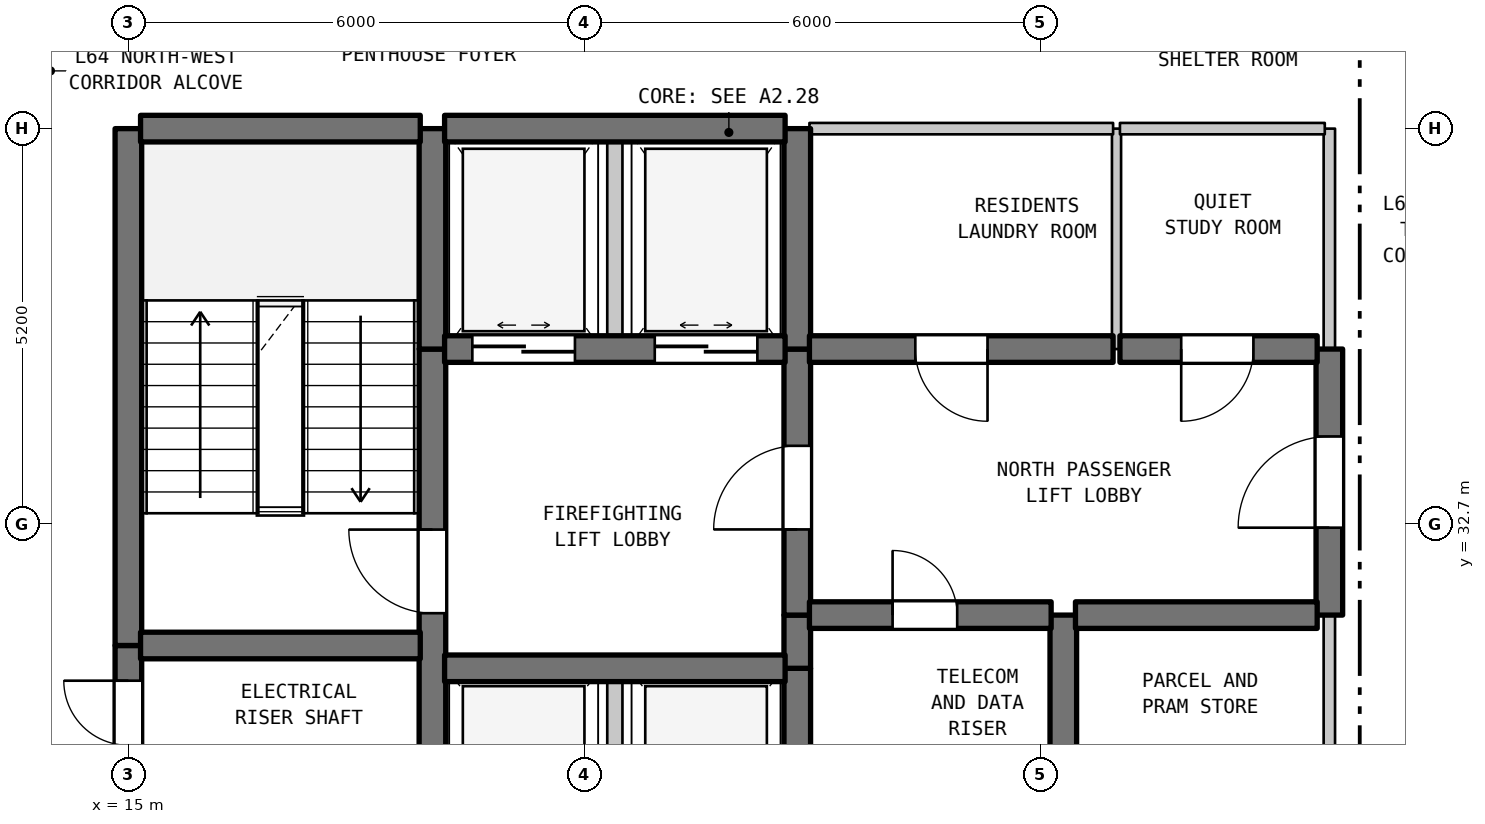
"""IFC4 building model, lengths in metres.
Left out: names, types, materials, properties, quantities, classifications, styles, units other than length and angle.
Written with IfcOpenShell. Run it as: python <this file> out.ifc"""

import sys

from ifc_helpers import new_model, si_unit, direction, frame, frame_2d, origin, place, context, subcontext, project, spatial, rectangle, extrude, element, fill, save


model = new_model("IFC4")
c1 = context("Model", 3, precision=1e-05, world=origin(), true_north=direction((0.0, 1.0)))
c2 = subcontext(c1, "Body", "Model", "MODEL_VIEW")
j1 = project(units=[si_unit("LENGTHUNIT", "METRE"), si_unit("PLANEANGLEUNIT", "RADIAN")], contexts=[c1])
p1 = place(None, origin())
s1 = spatial("IfcSite", under=j1, at=p1, CompositionType="ELEMENT")
p2 = place(p1, origin())
s2 = spatial("IfcBuilding", under=s1, at=p2, CompositionType="ELEMENT")
p3 = place(p2, frame((0.0, 0.0, 258.4)))
s3 = spatial("IfcBuildingStorey", under=s2, at=p3, CompositionType="ELEMENT", Elevation=258.4)
p4 = place(p3, frame((15.0, 29.5, 0.0), z_axis=(0.0, 0.0, 1.0), x_axis=(0.0, 1.0, 0.0)))
e1 = element("IfcWall", 1, at=p4, inside=s3, PredefinedType="SHEAR", context=c2, shape_type="SweptSolid", body=[
    extrude(rectangle(XDim=1.6, YDim=0.35, at=frame_2d((0.8, 0.0))), origin(), (0.0, 0.0, 1.0), 3.39),
])
p5 = place(p4, frame((0.287, 0.0, 0.0)))
e2 = element("IfcOpeningElement", 2, at=p5, cuts=e1, PredefinedType="OPENING", context=c2, shape_type="SweptSolid", body=[
    extrude(rectangle(XDim=0.85, YDim=2.1, at=frame_2d((0.425, 1.05))), frame((0.0, 0.185, 0.0), z_axis=(0.0, -1.0, 0.0), x_axis=(1.0, 0.0, 0.0)), (0.0, 0.0, 1.0), 0.37),
])
p6 = place(p3, frame((15.0, 31.1, 0.0), z_axis=(0.0, 0.0, 1.0), x_axis=(0.0, 1.0, 0.0)))
e3 = element("IfcWall", 3, at=p6, inside=s3, PredefinedType="SHEAR", context=c2, shape_type="SweptSolid", body=[
    extrude(rectangle(XDim=6.8, YDim=0.35, at=frame_2d((3.4, 0.0))), origin(), (0.0, 0.0, 1.0), 3.39),
])
p7 = place(p3, frame((19.0, 29.5, 0.0), z_axis=(0.0, 0.0, 1.0), x_axis=(0.0, 1.0, 0.0)))
e4 = element("IfcWall", 4, at=p7, inside=s3, PredefinedType="SHEAR", context=c2, shape_type="SweptSolid", body=[
    extrude(rectangle(XDim=5.5, YDim=0.35, at=frame_2d((2.75, 0.0))), origin(), (0.0, 0.0, 1.0), 3.39),
])
p8 = place(p7, frame((2.025, 0.0, 0.0)))
e5 = element("IfcOpeningElement", 5, at=p8, cuts=e4, PredefinedType="OPENING", context=c2, shape_type="SweptSolid", body=[
    extrude(rectangle(XDim=1.1, YDim=2.15, at=frame_2d((0.55, 1.075))), frame((0.0, 0.185, 0.0), z_axis=(0.0, -1.0, 0.0), x_axis=(1.0, 0.0, 0.0)), (0.0, 0.0, 1.0), 0.37),
])
p9 = place(p3, frame((19.0, 35.0, 0.0), z_axis=(0.0, 0.0, 1.0), x_axis=(0.0, 1.0, 0.0)))
e6 = element("IfcWall", 6, at=p9, inside=s3, PredefinedType="SHEAR", context=c2, shape_type="SweptSolid", body=[
    extrude(rectangle(XDim=2.9, YDim=0.35, at=frame_2d((1.45, 0.0))), origin(), (0.0, 0.0, 1.0), 3.39),
])
p10 = place(p3, frame((21.4, 28.2, 0.0), z_axis=(0.0, 0.0, 1.0), x_axis=(0.0, 1.0, 0.0)))
e7 = element("IfcWall", 7, at=p10, inside=s3, PredefinedType="STANDARD", context=c2, shape_type="SweptSolid", body=[
    extrude(rectangle(XDim=2.6, YDim=0.2, at=frame_2d((1.3, 0.0))), origin(), (0.0, 0.0, 1.0), 3.39),
])
p11 = place(p3, frame((21.4, 35.0, 0.0), z_axis=(0.0, 0.0, 1.0), x_axis=(0.0, 1.0, 0.0)))
e8 = element("IfcWall", 8, at=p11, inside=s3, PredefinedType="STANDARD", context=c2, shape_type="SweptSolid", body=[
    extrude(rectangle(XDim=2.9, YDim=0.2, at=frame_2d((1.45, 0.0))), origin(), (0.0, 0.0, 1.0), 3.39),
])
p12 = place(p3, frame((23.8, 28.2, 0.0), z_axis=(0.0, 0.0, 1.0), x_axis=(0.0, 1.0, 0.0)))
e9 = element("IfcWall", 9, at=p12, inside=s3, PredefinedType="SHEAR", context=c2, shape_type="SweptSolid", body=[
    extrude(rectangle(XDim=2.6, YDim=0.35, at=frame_2d((1.3, 0.0))), origin(), (0.0, 0.0, 1.0), 3.39),
])
p13 = place(p3, frame((23.8, 30.8, 0.0), z_axis=(0.0, 0.0, 1.0), x_axis=(0.0, 1.0, 0.0)))
e10 = element("IfcWall", 10, at=p13, inside=s3, PredefinedType="SHEAR", context=c2, shape_type="SweptSolid", body=[
    extrude(rectangle(XDim=0.7, YDim=0.35, at=frame_2d((0.35, 0.0))), origin(), (0.0, 0.0, 1.0), 3.39),
])
p14 = place(p3, frame((23.8, 31.5, 0.0), z_axis=(0.0, 0.0, 1.0), x_axis=(0.0, 1.0, 0.0)))
e11 = element("IfcWall", 11, at=p14, inside=s3, PredefinedType="SHEAR", context=c2, shape_type="SweptSolid", body=[
    extrude(rectangle(XDim=3.5, YDim=0.35, at=frame_2d((1.75, 0.0))), origin(), (0.0, 0.0, 1.0), 3.39),
])
p15 = place(p14, frame((1.127, 0.0, 0.0)))
e12 = element("IfcOpeningElement", 12, at=p15, cuts=e11, PredefinedType="OPENING", context=c2, shape_type="SweptSolid", body=[
    extrude(rectangle(XDim=1.1, YDim=2.15, at=frame_2d((0.55, 1.075))), frame((0.0, 0.185, 0.0), z_axis=(0.0, -1.0, 0.0), x_axis=(1.0, 0.0, 0.0)), (0.0, 0.0, 1.0), 0.37),
])
p16 = place(p3, frame((23.8, 35.0, 0.0), z_axis=(0.0, 0.0, 1.0), x_axis=(0.0, 1.0, 0.0)))
e13 = element("IfcWall", 13, at=p16, inside=s3, PredefinedType="SHEAR", context=c2, shape_type="SweptSolid", body=[
    extrude(rectangle(XDim=2.9, YDim=0.35, at=frame_2d((1.45, 0.0))), origin(), (0.0, 0.0, 1.0), 3.39),
])
p17 = place(p3, frame((27.3, 28.9, 0.0), z_axis=(0.0, 0.0, 1.0), x_axis=(0.0, 1.0, 0.0)))
e14 = element("IfcWall", 14, at=p17, inside=s3, PredefinedType="SHEAR", context=c2, shape_type="SweptSolid", body=[
    extrude(rectangle(XDim=2.6, YDim=0.35, at=frame_2d((1.3, 0.0))), origin(), (0.0, 0.0, 1.0), 3.39),
])
p18 = place(p3, frame((28.0, 35.0, 0.0), z_axis=(0.0, 0.0, 1.0), x_axis=(0.0, 1.0, 0.0)))
e15 = element("IfcWall", 15, at=p18, inside=s3, PredefinedType="PARTITIONING", context=c2, shape_type="SweptSolid", body=[
    extrude(rectangle(XDim=2.9, YDim=0.12, at=frame_2d((1.45, 0.0))), origin(), (0.0, 0.0, 1.0), 3.39),
])
p19 = place(p3, frame((30.8, 28.9, 0.0), z_axis=(0.0, 0.0, 1.0), x_axis=(0.0, 1.0, 0.0)))
e16 = element("IfcWall", 16, at=p19, inside=s3, PredefinedType="STANDARD", context=c2, shape_type="SweptSolid", body=[
    extrude(rectangle(XDim=2.6, YDim=0.15, at=frame_2d((1.3, 0.0))), origin(), (0.0, 0.0, 1.0), 3.39),
])
p20 = place(p3, frame((30.8, 31.5, 0.0), z_axis=(0.0, 0.0, 1.0), x_axis=(0.0, 1.0, 0.0)))
e17 = element("IfcWall", 17, at=p20, inside=s3, PredefinedType="SHEAR", context=c2, shape_type="SweptSolid", body=[
    extrude(rectangle(XDim=3.5, YDim=0.35, at=frame_2d((1.75, 0.0))), origin(), (0.0, 0.0, 1.0), 3.39),
])
p21 = place(p20, frame((1.15, 0.0, 0.0)))
e18 = element("IfcOpeningElement", 18, at=p21, cuts=e17, PredefinedType="OPENING", context=c2, shape_type="SweptSolid", body=[
    extrude(rectangle(XDim=1.2, YDim=2.2, at=frame_2d((0.6, 1.1))), frame((0.0, 0.185, 0.0), z_axis=(0.0, -1.0, 0.0), x_axis=(1.0, 0.0, 0.0)), (0.0, 0.0, 1.0), 0.37),
])
p22 = place(p3, frame((30.8, 35.0, 0.0), z_axis=(0.0, 0.0, 1.0), x_axis=(0.0, 1.0, 0.0)))
e19 = element("IfcWall", 19, at=p22, inside=s3, PredefinedType="STANDARD", context=c2, shape_type="SweptSolid", body=[
    extrude(rectangle(XDim=2.9, YDim=0.15, at=frame_2d((1.45, 0.0))), origin(), (0.0, 0.0, 1.0), 3.39),
])
p23 = place(p3, frame((19.16, 30.8, 0.0), z_axis=(0.0, 0.0, 1.0), x_axis=(1.0, 0.0, 0.0)))
e20 = element("IfcWall", 20, at=p23, inside=s3, PredefinedType="SHEAR", context=c2, shape_type="SweptSolid", body=[
    extrude(rectangle(XDim=4.48, YDim=0.35, at=frame_2d((2.24, 0.0))), origin(), (0.0, 0.0, 1.0), 3.39),
])
p24 = place(p3, frame((15.16, 31.1, 0.0), z_axis=(0.0, 0.0, 1.0), x_axis=(1.0, 0.0, 0.0)))
e21 = element("IfcWall", 21, at=p24, inside=s3, PredefinedType="SHEAR", context=c2, shape_type="SweptSolid", body=[
    extrude(rectangle(XDim=3.68, YDim=0.35, at=frame_2d((1.84, 0.0))), origin(), (0.0, 0.0, 1.0), 3.39),
])
p25 = place(p3, frame((23.96, 31.5, 0.0), z_axis=(0.0, 0.0, 1.0), x_axis=(1.0, 0.0, 0.0)))
e22 = element("IfcWall", 22, at=p25, inside=s3, PredefinedType="SHEAR", context=c2, shape_type="SweptSolid", body=[
    extrude(rectangle(XDim=3.18, YDim=0.35, at=frame_2d((1.59, 0.0))), origin(), (0.0, 0.0, 1.0), 3.39),
])
p26 = place(p25, frame((1.094, 0.0, 0.0)))
e23 = element("IfcOpeningElement", 23, at=p26, cuts=e22, PredefinedType="OPENING", context=c2, shape_type="SweptSolid", body=[
    extrude(rectangle(XDim=0.85, YDim=2.1, at=frame_2d((0.425, 1.05))), frame((0.0, 0.185, 0.0), z_axis=(0.0, -1.0, 0.0), x_axis=(1.0, 0.0, 0.0)), (0.0, 0.0, 1.0), 0.37),
])
p27 = place(p3, frame((27.46, 31.5, 0.0), z_axis=(0.0, 0.0, 1.0), x_axis=(1.0, 0.0, 0.0)))
e24 = element("IfcWall", 24, at=p27, inside=s3, PredefinedType="SHEAR", context=c2, shape_type="SweptSolid", body=[
    extrude(rectangle(XDim=3.18, YDim=0.35, at=frame_2d((1.59, 0.0))), origin(), (0.0, 0.0, 1.0), 3.39),
])
p28 = place(p3, frame((19.16, 35.0, 0.0), z_axis=(0.0, 0.0, 1.0), x_axis=(1.0, 0.0, 0.0)))
e25 = element("IfcWall", 25, at=p28, inside=s3, PredefinedType="SHEAR", context=c2, shape_type="SweptSolid", body=[
    extrude(rectangle(XDim=4.48, YDim=0.35, at=frame_2d((2.24, 0.0))), origin(), (0.0, 0.0, 1.0), 3.39),
])
p29 = place(p28, frame((0.365, 0.0, 0.0)))
e26 = element("IfcOpeningElement", 26, at=p29, cuts=e25, PredefinedType="OPENING", context=c2, shape_type="SweptSolid", body=[
    extrude(rectangle(XDim=1.35, YDim=2.2, at=frame_2d((0.675, 1.1))), frame((0.0, 0.185, 0.0), z_axis=(0.0, -1.0, 0.0), x_axis=(1.0, 0.0, 0.0)), (0.0, 0.0, 1.0), 0.37),
])
p30 = place(p28, frame((2.765, 0.0, 0.0)))
e27 = element("IfcOpeningElement", 27, at=p30, cuts=e25, PredefinedType="OPENING", context=c2, shape_type="SweptSolid", body=[
    extrude(rectangle(XDim=1.35, YDim=2.2, at=frame_2d((0.675, 1.1))), frame((0.0, 0.185, 0.0), z_axis=(0.0, -1.0, 0.0), x_axis=(1.0, 0.0, 0.0)), (0.0, 0.0, 1.0), 0.37),
])
p31 = place(p3, frame((23.96, 35.0, 0.0), z_axis=(0.0, 0.0, 1.0), x_axis=(1.0, 0.0, 0.0)))
e28 = element("IfcWall", 28, at=p31, inside=s3, PredefinedType="SHEAR", context=c2, shape_type="SweptSolid", body=[
    extrude(rectangle(XDim=3.995, YDim=0.35, at=frame_2d((1.998, 0.0))), origin(), (0.0, 0.0, 1.0), 3.39),
])
p32 = place(p31, frame((1.393, 0.0, 0.0)))
e29 = element("IfcOpeningElement", 29, at=p32, cuts=e28, PredefinedType="OPENING", context=c2, shape_type="SweptSolid", body=[
    extrude(rectangle(XDim=0.95, YDim=2.15, at=frame_2d((0.475, 1.075))), frame((0.0, 0.185, 0.0), z_axis=(0.0, -1.0, 0.0), x_axis=(1.0, 0.0, 0.0)), (0.0, 0.0, 1.0), 0.37),
])
p33 = place(p3, frame((28.045, 35.0, 0.0), z_axis=(0.0, 0.0, 1.0), x_axis=(1.0, 0.0, 0.0)))
e30 = element("IfcWall", 30, at=p33, inside=s3, PredefinedType="SHEAR", context=c2, shape_type="SweptSolid", body=[
    extrude(rectangle(XDim=2.595, YDim=0.35, at=frame_2d((1.297, 0.0))), origin(), (0.0, 0.0, 1.0), 3.39),
])
p34 = place(p33, frame((0.806, 0.0, 0.0)))
e31 = element("IfcOpeningElement", 31, at=p34, cuts=e30, PredefinedType="OPENING", context=c2, shape_type="SweptSolid", body=[
    extrude(rectangle(XDim=0.95, YDim=2.15, at=frame_2d((0.475, 1.075))), frame((0.0, 0.185, 0.0), z_axis=(0.0, -1.0, 0.0), x_axis=(1.0, 0.0, 0.0)), (0.0, 0.0, 1.0), 0.37),
])
p35 = place(p3, frame((15.16, 37.9, 0.0), z_axis=(0.0, 0.0, 1.0), x_axis=(1.0, 0.0, 0.0)))
e32 = element("IfcWall", 32, at=p35, inside=s3, PredefinedType="SHEAR", context=c2, shape_type="SweptSolid", body=[
    extrude(rectangle(XDim=3.68, YDim=0.35, at=frame_2d((1.84, 0.0))), origin(), (0.0, 0.0, 1.0), 3.39),
])
p36 = place(p3, frame((19.16, 37.9, 0.0), z_axis=(0.0, 0.0, 1.0), x_axis=(1.0, 0.0, 0.0)))
e33 = element("IfcWall", 33, at=p36, inside=s3, PredefinedType="SHEAR", context=c2, shape_type="SweptSolid", body=[
    extrude(rectangle(XDim=4.48, YDim=0.35, at=frame_2d((2.24, 0.0))), origin(), (0.0, 0.0, 1.0), 3.39),
])
p37 = place(p3, frame((23.96, 37.9, 0.0), z_axis=(0.0, 0.0, 1.0), x_axis=(1.0, 0.0, 0.0)))
e34 = element("IfcWall", 34, at=p37, inside=s3, PredefinedType="STANDARD", context=c2, shape_type="SweptSolid", body=[
    extrude(rectangle(XDim=3.995, YDim=0.15, at=frame_2d((1.998, 0.0))), origin(), (0.0, 0.0, 1.0), 2.89),
])
p38 = place(p3, frame((28.045, 37.9, 0.0), z_axis=(0.0, 0.0, 1.0), x_axis=(1.0, 0.0, 0.0)))
e35 = element("IfcWall", 35, at=p38, inside=s3, PredefinedType="STANDARD", context=c2, shape_type="SweptSolid", body=[
    extrude(rectangle(XDim=2.695, YDim=0.15, at=frame_2d((1.348, 0.0))), origin(), (0.0, 0.0, 1.0), 2.89),
])
p39 = place(p5, origin())
e36 = element("IfcDoor", 36, at=p39, inside=s3, OperationType="SINGLE_SWING_RIGHT", PredefinedType="DOOR", context=c2, shape_type="SweptSolid", body=[
    extrude(rectangle(XDim=0.85, YDim=2.1, at=frame_2d((0.425, 1.05))), frame((0.0, 0.025, 0.0), z_axis=(0.0, -1.0, 0.0), x_axis=(1.0, 0.0, 0.0)), (0.0, 0.0, 1.0), 0.05),
])
fill(e2, e36)
p40 = place(p8, origin())
e37 = element("IfcDoor", 37, at=p40, inside=s3, OperationType="SINGLE_SWING_RIGHT", PredefinedType="DOOR", context=c2, shape_type="SweptSolid", body=[
    extrude(rectangle(XDim=1.1, YDim=2.15, at=frame_2d((0.55, 1.075))), frame((0.0, 0.025, 0.0), z_axis=(0.0, -1.0, 0.0), x_axis=(1.0, 0.0, 0.0)), (0.0, 0.0, 1.0), 0.05),
])
fill(e5, e37)
p41 = place(p15, origin())
e38 = element("IfcDoor", 38, at=p41, inside=s3, OperationType="SINGLE_SWING_LEFT", PredefinedType="DOOR", context=c2, shape_type="SweptSolid", body=[
    extrude(rectangle(XDim=1.1, YDim=2.15, at=frame_2d((0.55, 1.075))), frame((0.0, 0.025, 0.0), z_axis=(0.0, -1.0, 0.0), x_axis=(1.0, 0.0, 0.0)), (0.0, 0.0, 1.0), 0.05),
])
fill(e12, e38)
p42 = place(p21, origin())
e39 = element("IfcDoor", 39, at=p42, inside=s3, OperationType="SINGLE_SWING_LEFT", PredefinedType="DOOR", context=c2, shape_type="SweptSolid", body=[
    extrude(rectangle(XDim=1.2, YDim=2.2, at=frame_2d((0.6, 1.1))), frame((0.0, 0.025, 0.0), z_axis=(0.0, -1.0, 0.0), x_axis=(1.0, 0.0, 0.0)), (0.0, 0.0, 1.0), 0.05),
])
fill(e18, e39)
p43 = place(p26, origin())
e40 = element("IfcDoor", 40, at=p43, inside=s3, OperationType="SINGLE_SWING_LEFT", PredefinedType="DOOR", context=c2, shape_type="SweptSolid", body=[
    extrude(rectangle(XDim=0.85, YDim=2.1, at=frame_2d((0.425, 1.05))), frame((0.0, 0.025, 0.0), z_axis=(0.0, -1.0, 0.0), x_axis=(1.0, 0.0, 0.0)), (0.0, 0.0, 1.0), 0.05),
])
fill(e23, e40)
p44 = place(p29, origin())
e41 = element("IfcDoor", 41, at=p44, inside=s3, OperationType="DOUBLE_DOOR_SLIDING", PredefinedType="DOOR", context=c2, shape_type="SweptSolid", body=[
    extrude(rectangle(XDim=1.35, YDim=2.2, at=frame_2d((0.675, 1.1))), frame((0.0, 0.025, 0.0), z_axis=(0.0, -1.0, 0.0), x_axis=(1.0, 0.0, 0.0)), (0.0, 0.0, 1.0), 0.05),
])
fill(e26, e41)
p45 = place(p30, origin())
e42 = element("IfcDoor", 42, at=p45, inside=s3, OperationType="DOUBLE_DOOR_SLIDING", PredefinedType="DOOR", context=c2, shape_type="SweptSolid", body=[
    extrude(rectangle(XDim=1.35, YDim=2.2, at=frame_2d((0.675, 1.1))), frame((0.0, 0.025, 0.0), z_axis=(0.0, -1.0, 0.0), x_axis=(1.0, 0.0, 0.0)), (0.0, 0.0, 1.0), 0.05),
])
fill(e27, e42)
p46 = place(p32, frame((0.95, 0.0, 0.0), z_axis=(0.0, 0.0, 1.0), x_axis=(-1.0, 0.0, 0.0)))
e43 = element("IfcDoor", 43, at=p46, inside=s3, OperationType="SINGLE_SWING_RIGHT", PredefinedType="DOOR", context=c2, shape_type="SweptSolid", body=[
    extrude(rectangle(XDim=0.95, YDim=2.15, at=frame_2d((0.475, 1.075))), frame((0.0, 0.025, 0.0), z_axis=(0.0, -1.0, 0.0), x_axis=(1.0, 0.0, 0.0)), (0.0, 0.0, 1.0), 0.05),
])
fill(e29, e43)
p47 = place(p34, frame((0.95, 0.0, 0.0), z_axis=(0.0, 0.0, 1.0), x_axis=(-1.0, 0.0, 0.0)))
e44 = element("IfcDoor", 44, at=p47, inside=s3, OperationType="SINGLE_SWING_LEFT", PredefinedType="DOOR", context=c2, shape_type="SweptSolid", body=[
    extrude(rectangle(XDim=0.95, YDim=2.15, at=frame_2d((0.475, 1.075))), frame((0.0, 0.025, 0.0), z_axis=(0.0, -1.0, 0.0), x_axis=(1.0, 0.0, 0.0)), (0.0, 0.0, 1.0), 0.05),
])
fill(e31, e44)
save(model, sys.argv[1])
